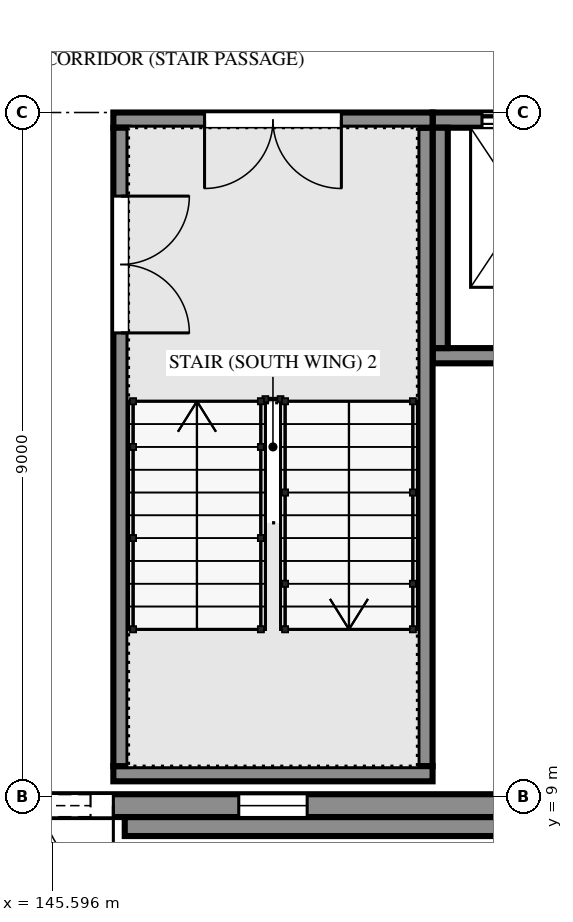
"""IFC4 building model, lengths in metres.
Left out: names, types, materials, properties, quantities, classifications, styles, units other than length and angle.
Written with IfcOpenShell. Run it as: python <this file> out.ifc"""

import sys

from ifc_helpers import new_model, si_unit, direction, frame, frame_2d, origin, place, context, subcontext, project, spatial, polyline, rectangle, outline, extrude, element, fill, save


model = new_model("IFC4")
c1 = context("Model", 3, precision=1e-05, world=origin(), true_north=direction((0.0, 1.0)))
c2 = subcontext(c1, "Body", "Model", "MODEL_VIEW")
j1 = project(units=[si_unit("LENGTHUNIT", "METRE"), si_unit("PLANEANGLEUNIT", "RADIAN")], contexts=[c1])
p1 = place(None, origin())
s1 = spatial("IfcSite", under=j1, at=p1, CompositionType="ELEMENT")
p2 = place(p1, origin())
s2 = spatial("IfcBuilding", under=s1, at=p2, CompositionType="ELEMENT")
p3 = place(p2, origin())
s3 = spatial("IfcBuildingStorey", under=s2, at=p3, CompositionType="ELEMENT", Elevation=0.0)
p4 = place(p3, frame((144.127, 8.88, 0.0), z_axis=(0.0, 0.0, 1.0), x_axis=(1.0, 0.0, 0.0)))
e1 = element("IfcWall", 1, at=p4, inside=s3, PredefinedType="SOLIDWALL", context=c2, shape_type="SweptSolid", body=[
    extrude(rectangle(XDim=8.746, YDim=0.3, at=frame_2d((4.373, 0.0))), origin(), (0.0, 0.0, 1.0), 6.767),
])
p5 = place(p4, frame((0.473, 0.0, 0.0)))
e2 = element("IfcOpeningElement", 2, at=p5, cuts=e1, PredefinedType="OPENING", context=c2, shape_type="SweptSolid", body=[
    extrude(rectangle(XDim=1.8, YDim=2.4, at=frame_2d((0.9, 1.2))), frame((0.0, 0.16, 0.0), z_axis=(0.0, -1.0, 0.0), x_axis=(1.0, 0.0, 0.0)), (0.0, 0.0, 1.0), 0.32),
])
p6 = place(p4, frame((0.773, 0.0, 2.55)))
e3 = element("IfcOpeningElement", 3, at=p6, cuts=e1, PredefinedType="OPENING", context=c2, shape_type="SweptSolid", body=[
    extrude(rectangle(XDim=1.2, YDim=0.6, at=frame_2d((0.6, 0.3))), frame((0.0, 0.16, 0.0), z_axis=(0.0, -1.0, 0.0), x_axis=(1.0, 0.0, 0.0)), (0.0, 0.0, 1.0), 0.32),
])
p7 = place(p4, frame((3.923, 0.0, 1.2)))
e4 = element("IfcOpeningElement", 4, at=p7, cuts=e1, PredefinedType="OPENING", context=c2, shape_type="SweptSolid", body=[
    extrude(rectangle(XDim=0.9, YDim=1.8, at=frame_2d((0.45, 0.9))), frame((0.0, 0.16, 0.0), z_axis=(0.0, -1.0, 0.0), x_axis=(1.0, 0.0, 0.0)), (0.0, 0.0, 1.0), 0.32),
])
p8 = place(p3, frame((146.55, 8.605, 0.0), z_axis=(0.0, 0.0, 1.0), x_axis=(1.0, 0.0, 0.0)))
e5 = element("IfcWall", 5, at=p8, inside=s3, PredefinedType="SOLIDWALL", context=c2, shape_type="SweptSolid", body=[
    extrude(outline(polyline([(0.0, 0.0), (6.86, 0.0), (6.86, 6.767), (0.0, 6.767), (0.0, 0.0)]), holes=[polyline([(1.35, 1.05), (1.35, 3.0), (1.374, 3.252), (1.47, 3.468), (1.554, 3.522), (1.626, 3.666), (1.782, 3.81), (1.95, 3.9), (2.118, 3.81), (2.274, 3.666), (2.346, 3.522), (2.43, 3.468), (2.526, 3.252), (2.55, 3.0), (2.55, 1.05), (1.35, 1.05)])]), frame((0.0, 0.125, 0.0), z_axis=(0.0, -1.0, 0.0), x_axis=(1.0, 0.0, 0.0)), (0.0, 0.0, 1.0), 0.25),
])
p9 = place(p3, frame((146.4, 9.3, 0.0), z_axis=(0.0, 0.0, 1.0), x_axis=(1.0, 0.0, 0.0)))
e6 = element("IfcWall", 6, at=p9, inside=s3, PredefinedType="SOLIDWALL", context=c2, shape_type="SweptSolid", body=[
    extrude(rectangle(XDim=4.2, YDim=0.2, at=frame_2d((2.1, 0.0))), origin(), (0.0, 0.0, 1.0), 6.757),
])
p10 = place(p3, frame((146.4, 17.9, 0.0), z_axis=(0.0, 0.0, 1.0), x_axis=(1.0, 0.0, 0.0)))
e7 = element("IfcWall", 7, at=p10, inside=s3, PredefinedType="SOLIDWALL", context=c2, shape_type="SweptSolid", body=[
    extrude(rectangle(XDim=4.2, YDim=0.2, at=frame_2d((2.1, 0.0))), origin(), (0.0, 0.0, 1.0), 6.757),
])
p11 = place(p10, frame((1.2, 0.0, 0.0)))
e8 = element("IfcOpeningElement", 8, at=p11, cuts=e7, PredefinedType="OPENING", context=c2, shape_type="SweptSolid", body=[
    extrude(rectangle(XDim=1.8, YDim=2.1, at=frame_2d((0.9, 1.05))), frame((0.0, 0.11, 0.0), z_axis=(0.0, -1.0, 0.0), x_axis=(1.0, 0.0, 0.0)), (0.0, 0.0, 1.0), 0.22),
])
p12 = place(p3, frame((146.5, 9.4, 0.0), z_axis=(0.0, 0.0, 1.0), x_axis=(0.0, 1.0, 0.0)))
e9 = element("IfcWall", 9, at=p12, inside=s3, PredefinedType="SOLIDWALL", context=c2, shape_type="SweptSolid", body=[
    extrude(rectangle(XDim=8.4, YDim=0.2, at=frame_2d((4.2, 0.0))), origin(), (0.0, 0.0, 1.0), 6.757),
])
p13 = place(p12, frame((5.7, 0.0, 0.0)))
e10 = element("IfcOpeningElement", 10, at=p13, cuts=e9, PredefinedType="OPENING", context=c2, shape_type="SweptSolid", body=[
    extrude(rectangle(XDim=1.8, YDim=2.1, at=frame_2d((0.9, 1.05))), frame((0.0, 0.11, 0.0), z_axis=(0.0, -1.0, 0.0), x_axis=(1.0, 0.0, 0.0)), (0.0, 0.0, 1.0), 0.22),
])
p14 = place(p3, frame((150.5, 9.4, 0.0), z_axis=(0.0, 0.0, 1.0), x_axis=(0.0, 1.0, 0.0)))
e11 = element("IfcWall", 11, at=p14, inside=s3, PredefinedType="SOLIDWALL", context=c2, shape_type="SweptSolid", body=[
    extrude(rectangle(XDim=8.4, YDim=0.2, at=frame_2d((4.2, 0.0))), origin(), (0.0, 0.0, 1.0), 6.757),
])
p15 = place(p3, frame((150.602, 14.8, -1.6), z_axis=(0.0, 0.0, 1.0), x_axis=(1.0, 0.0, 0.0)))
e12 = element("IfcWall", 12, at=p15, inside=s3, PredefinedType="SOLIDWALL", context=c2, shape_type="SweptSolid", body=[
    extrude(rectangle(XDim=2.236, YDim=0.2, at=frame_2d((1.118, 0.0))), origin(), (0.0, 0.0, 1.0), 8.357),
])
p16 = place(p3, frame((150.602, 17.9, -1.6), z_axis=(0.0, 0.0, 1.0), x_axis=(1.0, 0.0, 0.0)))
e13 = element("IfcWall", 13, at=p16, inside=s3, PredefinedType="SOLIDWALL", context=c2, shape_type="SweptSolid", body=[
    extrude(rectangle(XDim=2.398, YDim=0.2, at=frame_2d((1.199, 0.0))), origin(), (0.0, 0.0, 1.0), 8.357),
])
p17 = place(p16, frame((0.648, 0.0, 1.6)))
e14 = element("IfcOpeningElement", 14, at=p17, cuts=e13, PredefinedType="OPENING", context=c2, shape_type="SweptSolid", body=[
    extrude(rectangle(XDim=1.1, YDim=2.1, at=frame_2d((0.55, 1.05))), frame((0.0, 0.11, 0.0), z_axis=(0.0, -1.0, 0.0), x_axis=(1.0, 0.0, 0.0)), (0.0, 0.0, 1.0), 0.22),
])
p18 = place(p3, frame((150.7, 14.9, -1.6), z_axis=(0.0, 0.0, 1.0), x_axis=(0.0, 1.0, 0.0)))
e15 = element("IfcWall", 15, at=p18, inside=s3, PredefinedType="SOLIDWALL", context=c2, shape_type="SweptSolid", body=[
    extrude(rectangle(XDim=2.9, YDim=0.2, at=frame_2d((1.45, 0.0))), origin(), (0.0, 0.0, 1.0), 8.357),
])
p19 = place(p5, frame((1.8, 0.0, 0.0), z_axis=(0.0, 0.0, 1.0), x_axis=(-1.0, 0.0, 0.0)))
e16 = element("IfcDoor", 16, at=p19, inside=s3, OperationType="DOUBLE_DOOR_SINGLE_SWING", PredefinedType="DOOR", context=c2, shape_type="SweptSolid", body=[
    extrude(outline(polyline([(0.0, 0.0), (0.07, 0.0), (0.07, 2.33), (1.73, 2.33), (1.73, 0.0), (1.8, 0.0), (1.8, 2.4), (0.0, 2.4), (0.0, 0.0)])), frame((0.0, 0.025, 0.0), z_axis=(0.0, -1.0, 0.0), x_axis=(1.0, 0.0, 0.0)), (0.0, 0.0, 1.0), 0.05),
    extrude(outline(polyline([(0.074, 0.01), (0.897, 0.01), (0.897, 2.326), (0.074, 2.326), (0.074, 0.01)]), holes=[polyline([(0.194, 0.16), (0.777, 0.16), (0.777, 1.01), (0.194, 1.01), (0.194, 0.16)]), polyline([(0.335, 1.16), (0.635, 1.16), (0.635, 1.76), (0.335, 1.76), (0.335, 1.16)])]), frame((0.0, 0.017, 0.0), z_axis=(0.0, -1.0, 0.0), x_axis=(1.0, 0.0, 0.0)), (0.0, 0.0, 1.0), 0.035),
    extrude(rectangle(XDim=0.583, YDim=0.85, at=frame_2d((0.485, 0.585))), frame((0.0, 0.009, 0.0), z_axis=(0.0, -1.0, 0.0), x_axis=(1.0, 0.0, 0.0)), (0.0, 0.0, 1.0), 0.017),
    extrude(rectangle(XDim=0.3, YDim=0.6, at=frame_2d((0.485, 1.46))), frame((0.0, 0.006, 0.0), z_axis=(0.0, -1.0, 0.0), x_axis=(1.0, 0.0, 0.0)), (0.0, 0.0, 1.0), 0.012),
    extrude(outline(polyline([(0.903, 0.01), (1.726, 0.01), (1.726, 2.326), (0.903, 2.326), (0.903, 0.01)]), holes=[polyline([(1.023, 0.16), (1.606, 0.16), (1.606, 1.01), (1.023, 1.01), (1.023, 0.16)]), polyline([(1.165, 1.16), (1.465, 1.16), (1.465, 1.76), (1.165, 1.76), (1.165, 1.16)])]), frame((0.0, 0.017, 0.0), z_axis=(0.0, -1.0, 0.0), x_axis=(1.0, 0.0, 0.0)), (0.0, 0.0, 1.0), 0.035),
    extrude(rectangle(XDim=0.583, YDim=0.85, at=frame_2d((1.314, 0.585))), frame((0.0, 0.009, 0.0), z_axis=(0.0, -1.0, 0.0), x_axis=(1.0, 0.0, 0.0)), (0.0, 0.0, 1.0), 0.017),
    extrude(rectangle(XDim=0.3, YDim=0.6, at=frame_2d((1.314, 1.46))), frame((0.0, 0.006, 0.0), z_axis=(0.0, -1.0, 0.0), x_axis=(1.0, 0.0, 0.0)), (0.0, 0.0, 1.0), 0.012),
])
fill(e2, e16)
p20 = place(p6, origin())
e17 = element("IfcWindow", 17, at=p20, inside=s3, PartitioningType="SINGLE_PANEL", PredefinedType="WINDOW", context=c2, shape_type="SweptSolid", body=[
    extrude(outline(polyline([(0.0, 0.0), (1.2, 0.0), (1.2, 0.6), (0.0, 0.6), (0.0, 0.0)]), holes=[polyline([(0.07, 0.07), (1.13, 0.07), (1.13, 0.53), (0.07, 0.53), (0.07, 0.07)])]), frame((0.0, 0.03, 0.0), z_axis=(0.0, -1.0, 0.0), x_axis=(1.0, 0.0, 0.0)), (0.0, 0.0, 1.0), 0.06),
    extrude(outline(polyline([(0.07, 0.07), (1.13, 0.07), (1.13, 0.53), (0.07, 0.53), (0.07, 0.07)]), holes=[polyline([(0.1, 0.1), (1.1, 0.1), (1.1, 0.5), (0.1, 0.5), (0.1, 0.1)])]), frame((0.0, 0.022, 0.0), z_axis=(0.0, -1.0, 0.0), x_axis=(1.0, 0.0, 0.0)), (0.0, 0.0, 1.0), 0.045),
    extrude(rectangle(XDim=1.0, YDim=0.4, at=frame_2d((0.6, 0.3))), frame((0.0, 0.006, 0.0), z_axis=(0.0, -1.0, 0.0), x_axis=(1.0, 0.0, 0.0)), (0.0, 0.0, 1.0), 0.012),
])
fill(e3, e17)
p21 = place(p7, origin())
e18 = element("IfcWindow", 18, at=p21, inside=s3, PartitioningType="SINGLE_PANEL", PredefinedType="WINDOW", context=c2, shape_type="SweptSolid", body=[
    extrude(outline(polyline([(0.0, 0.0), (0.9, 0.0), (0.9, 1.235), (0.896, 1.3), (0.885, 1.364), (0.867, 1.426), (0.843, 1.486), (0.811, 1.543), (0.774, 1.596), (0.73, 1.645), (0.682, 1.688), (0.629, 1.726), (0.572, 1.757), (0.512, 1.782), (0.45, 1.8), (0.387, 1.782), (0.328, 1.757), (0.271, 1.726), (0.218, 1.688), (0.169, 1.645), (0.126, 1.596), (0.089, 1.543), (0.057, 1.486), (0.032, 1.426), (0.014, 1.364), (0.004, 1.3), (0.0, 1.235), (0.0, 0.0)]), holes=[polyline([(0.07, 0.07), (0.83, 0.07), (0.83, 1.235), (0.827, 1.291), (0.818, 1.346), (0.803, 1.4), (0.782, 1.451), (0.755, 1.501), (0.724, 1.547), (0.688, 1.589), (0.647, 1.627), (0.602, 1.661), (0.554, 1.689), (0.503, 1.713), (0.45, 1.73), (0.397, 1.713), (0.346, 1.689), (0.298, 1.661), (0.253, 1.627), (0.212, 1.589), (0.176, 1.547), (0.145, 1.501), (0.118, 1.451), (0.097, 1.4), (0.082, 1.346), (0.073, 1.291), (0.07, 1.235), (0.07, 0.07)])]), frame((0.0, 0.03, 0.0), z_axis=(0.0, -1.0, 0.0), x_axis=(1.0, 0.0, 0.0)), (0.0, 0.0, 1.0), 0.06),
    extrude(outline(polyline([(0.0, 1.235), (0.004, 1.3), (0.014, 1.364), (0.032, 1.426), (0.057, 1.486), (0.089, 1.543), (0.126, 1.596), (0.169, 1.645), (0.218, 1.688), (0.271, 1.726), (0.328, 1.757), (0.387, 1.782), (0.45, 1.8), (0.0, 1.8), (0.0, 1.235)])), frame((0.0, 0.028, 0.0), z_axis=(0.0, -1.0, 0.0), x_axis=(1.0, 0.0, 0.0)), (0.0, 0.0, 1.0), 0.056),
    extrude(outline(polyline([(0.45, 1.8), (0.512, 1.782), (0.572, 1.757), (0.629, 1.726), (0.682, 1.688), (0.73, 1.645), (0.774, 1.596), (0.811, 1.543), (0.843, 1.486), (0.867, 1.426), (0.885, 1.364), (0.896, 1.3), (0.9, 1.235), (0.9, 1.8), (0.45, 1.8)])), frame((0.0, 0.027, 0.0), z_axis=(0.0, -1.0, 0.0), x_axis=(1.0, 0.0, 0.0)), (0.0, 0.0, 1.0), 0.054),
    extrude(outline(polyline([(0.828, 1.275), (0.072, 1.275), (0.07, 1.235), (0.07, 1.195), (0.83, 1.195), (0.83, 1.235), (0.828, 1.275)])), frame((0.0, 0.021, 0.0), z_axis=(0.0, -1.0, 0.0), x_axis=(1.0, 0.0, 0.0)), (0.0, 0.0, 1.0), 0.042),
    extrude(outline(polyline([(0.07, 0.07), (0.83, 0.07), (0.83, 1.195), (0.07, 1.195), (0.07, 0.07)]), holes=[polyline([(0.1, 0.1), (0.8, 0.1), (0.8, 1.165), (0.1, 1.165), (0.1, 0.1)])]), frame((0.0, 0.022, 0.0), z_axis=(0.0, -1.0, 0.0), x_axis=(1.0, 0.0, 0.0)), (0.0, 0.0, 1.0), 0.045),
    extrude(rectangle(XDim=0.7, YDim=1.065, at=frame_2d((0.45, 0.632))), frame((0.0, 0.006, 0.0), z_axis=(0.0, -1.0, 0.0), x_axis=(1.0, 0.0, 0.0)), (0.0, 0.0, 1.0), 0.012),
    extrude(outline(polyline([(0.072, 1.275), (0.828, 1.275), (0.827, 1.291), (0.818, 1.346), (0.803, 1.4), (0.782, 1.451), (0.755, 1.501), (0.724, 1.547), (0.688, 1.589), (0.647, 1.627), (0.602, 1.661), (0.554, 1.689), (0.503, 1.713), (0.45, 1.73), (0.397, 1.713), (0.346, 1.689), (0.298, 1.661), (0.253, 1.627), (0.212, 1.589), (0.176, 1.547), (0.145, 1.501), (0.118, 1.451), (0.097, 1.4), (0.082, 1.346), (0.073, 1.291), (0.072, 1.275)]), holes=[polyline([(0.112, 1.31), (0.116, 1.338), (0.13, 1.388), (0.15, 1.437), (0.175, 1.483), (0.204, 1.526), (0.238, 1.565), (0.276, 1.601), (0.317, 1.632), (0.362, 1.658), (0.409, 1.68), (0.45, 1.693), (0.49, 1.68), (0.538, 1.658), (0.583, 1.632), (0.624, 1.601), (0.662, 1.565), (0.696, 1.526), (0.725, 1.483), (0.75, 1.437), (0.77, 1.388), (0.783, 1.338), (0.788, 1.31), (0.112, 1.31)])]), frame((0.0, 0.022, 0.0), z_axis=(0.0, -1.0, 0.0), x_axis=(1.0, 0.0, 0.0)), (0.0, 0.0, 1.0), 0.045),
    extrude(outline(polyline([(0.788, 1.31), (0.783, 1.338), (0.77, 1.388), (0.75, 1.437), (0.725, 1.483), (0.696, 1.526), (0.662, 1.565), (0.624, 1.601), (0.583, 1.632), (0.538, 1.658), (0.49, 1.68), (0.45, 1.693), (0.409, 1.68), (0.362, 1.658), (0.317, 1.632), (0.276, 1.601), (0.238, 1.565), (0.204, 1.526), (0.175, 1.483), (0.15, 1.437), (0.13, 1.388), (0.116, 1.338), (0.112, 1.31), (0.788, 1.31)])), frame((0.0, 0.006, 0.0), z_axis=(0.0, -1.0, 0.0), x_axis=(1.0, 0.0, 0.0)), (0.0, 0.0, 1.0), 0.012),
])
fill(e4, e18)
p22 = place(p17, origin())
e19 = element("IfcDoor", 19, at=p22, inside=s3, OperationType="SLIDING_TO_LEFT", PredefinedType="DOOR", context=c2, shape_type="SweptSolid", body=[
    extrude(outline(polyline([(0.0, 0.0), (0.07, 0.0), (0.07, 2.03), (1.03, 2.03), (1.03, 0.0), (1.1, 0.0), (1.1, 2.1), (0.0, 2.1), (0.0, 0.0)])), frame((0.0, 0.025, 0.0), z_axis=(0.0, -1.0, 0.0), x_axis=(1.0, 0.0, 0.0)), (0.0, 0.0, 1.0), 0.05),
    extrude(rectangle(XDim=0.524, YDim=2.016, at=frame_2d((0.336, 1.018))), frame((0.0, 0.018, 0.0), z_axis=(0.0, -1.0, 0.0), x_axis=(1.0, 0.0, 0.0)), (0.0, 0.0, 1.0), 0.016),
    extrude(rectangle(XDim=0.52, YDim=2.016, at=frame_2d((0.766, 1.018))), frame((0.0, -0.002, 0.0), z_axis=(0.0, -1.0, 0.0), x_axis=(1.0, 0.0, 0.0)), (0.0, 0.0, 1.0), 0.016),
])
fill(e14, e19)
p23 = place(p13, frame((1.8, 0.0, 0.0), z_axis=(0.0, 0.0, 1.0), x_axis=(-1.0, 0.0, 0.0)))
e20 = element("IfcDoor", 20, at=p23, inside=s3, OperationType="DOUBLE_DOOR_SINGLE_SWING", PredefinedType="DOOR", context=c2, shape_type="SweptSolid", body=[
    extrude(outline(polyline([(0.0, 0.0), (0.07, 0.0), (0.07, 2.03), (1.73, 2.03), (1.73, 0.0), (1.8, 0.0), (1.8, 2.1), (0.0, 2.1), (0.0, 0.0)])), frame((0.0, 0.025, 0.0), z_axis=(0.0, -1.0, 0.0), x_axis=(1.0, 0.0, 0.0)), (0.0, 0.0, 1.0), 0.05),
    extrude(outline(polyline([(0.074, 0.01), (0.897, 0.01), (0.897, 2.026), (0.074, 2.026), (0.074, 0.01)]), holes=[polyline([(0.194, 0.16), (0.777, 0.16), (0.777, 1.01), (0.194, 1.01), (0.194, 0.16)]), polyline([(0.335, 1.16), (0.635, 1.16), (0.635, 1.76), (0.335, 1.76), (0.335, 1.16)])]), frame((0.0, 0.017, 0.0), z_axis=(0.0, -1.0, 0.0), x_axis=(1.0, 0.0, 0.0)), (0.0, 0.0, 1.0), 0.035),
    extrude(rectangle(XDim=0.583, YDim=0.85, at=frame_2d((0.485, 0.585))), frame((0.0, 0.009, 0.0), z_axis=(0.0, -1.0, 0.0), x_axis=(1.0, 0.0, 0.0)), (0.0, 0.0, 1.0), 0.017),
    extrude(rectangle(XDim=0.3, YDim=0.6, at=frame_2d((0.485, 1.46))), frame((0.0, 0.006, 0.0), z_axis=(0.0, -1.0, 0.0), x_axis=(1.0, 0.0, 0.0)), (0.0, 0.0, 1.0), 0.012),
    extrude(outline(polyline([(0.903, 0.01), (1.726, 0.01), (1.726, 2.026), (0.903, 2.026), (0.903, 0.01)]), holes=[polyline([(1.023, 0.16), (1.606, 0.16), (1.606, 1.01), (1.023, 1.01), (1.023, 0.16)]), polyline([(1.165, 1.16), (1.465, 1.16), (1.465, 1.76), (1.165, 1.76), (1.165, 1.16)])]), frame((0.0, 0.017, 0.0), z_axis=(0.0, -1.0, 0.0), x_axis=(1.0, 0.0, 0.0)), (0.0, 0.0, 1.0), 0.035),
    extrude(rectangle(XDim=0.583, YDim=0.85, at=frame_2d((1.314, 0.585))), frame((0.0, 0.009, 0.0), z_axis=(0.0, -1.0, 0.0), x_axis=(1.0, 0.0, 0.0)), (0.0, 0.0, 1.0), 0.017),
    extrude(rectangle(XDim=0.3, YDim=0.6, at=frame_2d((1.314, 1.46))), frame((0.0, 0.006, 0.0), z_axis=(0.0, -1.0, 0.0), x_axis=(1.0, 0.0, 0.0)), (0.0, 0.0, 1.0), 0.012),
])
fill(e10, e20)
p24 = place(p11, frame((1.8, 0.0, 0.0), z_axis=(0.0, 0.0, 1.0), x_axis=(-1.0, 0.0, 0.0)))
e21 = element("IfcDoor", 21, at=p24, inside=s3, OperationType="DOUBLE_DOOR_SINGLE_SWING", PredefinedType="DOOR", context=c2, shape_type="SweptSolid", body=[
    extrude(outline(polyline([(0.0, 0.0), (0.07, 0.0), (0.07, 2.03), (1.73, 2.03), (1.73, 0.0), (1.8, 0.0), (1.8, 2.1), (0.0, 2.1), (0.0, 0.0)])), frame((0.0, 0.025, 0.0), z_axis=(0.0, -1.0, 0.0), x_axis=(1.0, 0.0, 0.0)), (0.0, 0.0, 1.0), 0.05),
    extrude(outline(polyline([(0.074, 0.01), (0.897, 0.01), (0.897, 2.026), (0.074, 2.026), (0.074, 0.01)]), holes=[polyline([(0.194, 0.16), (0.777, 0.16), (0.777, 1.01), (0.194, 1.01), (0.194, 0.16)]), polyline([(0.335, 1.16), (0.635, 1.16), (0.635, 1.76), (0.335, 1.76), (0.335, 1.16)])]), frame((0.0, 0.017, 0.0), z_axis=(0.0, -1.0, 0.0), x_axis=(1.0, 0.0, 0.0)), (0.0, 0.0, 1.0), 0.035),
    extrude(rectangle(XDim=0.583, YDim=0.85, at=frame_2d((0.485, 0.585))), frame((0.0, 0.009, 0.0), z_axis=(0.0, -1.0, 0.0), x_axis=(1.0, 0.0, 0.0)), (0.0, 0.0, 1.0), 0.017),
    extrude(rectangle(XDim=0.3, YDim=0.6, at=frame_2d((0.485, 1.46))), frame((0.0, 0.006, 0.0), z_axis=(0.0, -1.0, 0.0), x_axis=(1.0, 0.0, 0.0)), (0.0, 0.0, 1.0), 0.012),
    extrude(outline(polyline([(0.903, 0.01), (1.726, 0.01), (1.726, 2.026), (0.903, 2.026), (0.903, 0.01)]), holes=[polyline([(1.023, 0.16), (1.606, 0.16), (1.606, 1.01), (1.023, 1.01), (1.023, 0.16)]), polyline([(1.165, 1.16), (1.465, 1.16), (1.465, 1.76), (1.165, 1.76), (1.165, 1.16)])]), frame((0.0, 0.017, 0.0), z_axis=(0.0, -1.0, 0.0), x_axis=(1.0, 0.0, 0.0)), (0.0, 0.0, 1.0), 0.035),
    extrude(rectangle(XDim=0.583, YDim=0.85, at=frame_2d((1.314, 0.585))), frame((0.0, 0.009, 0.0), z_axis=(0.0, -1.0, 0.0), x_axis=(1.0, 0.0, 0.0)), (0.0, 0.0, 1.0), 0.017),
    extrude(rectangle(XDim=0.3, YDim=0.6, at=frame_2d((1.314, 1.46))), frame((0.0, 0.006, 0.0), z_axis=(0.0, -1.0, 0.0), x_axis=(1.0, 0.0, 0.0)), (0.0, 0.0, 1.0), 0.012),
])
fill(e8, e21)
save(model, sys.argv[1])
